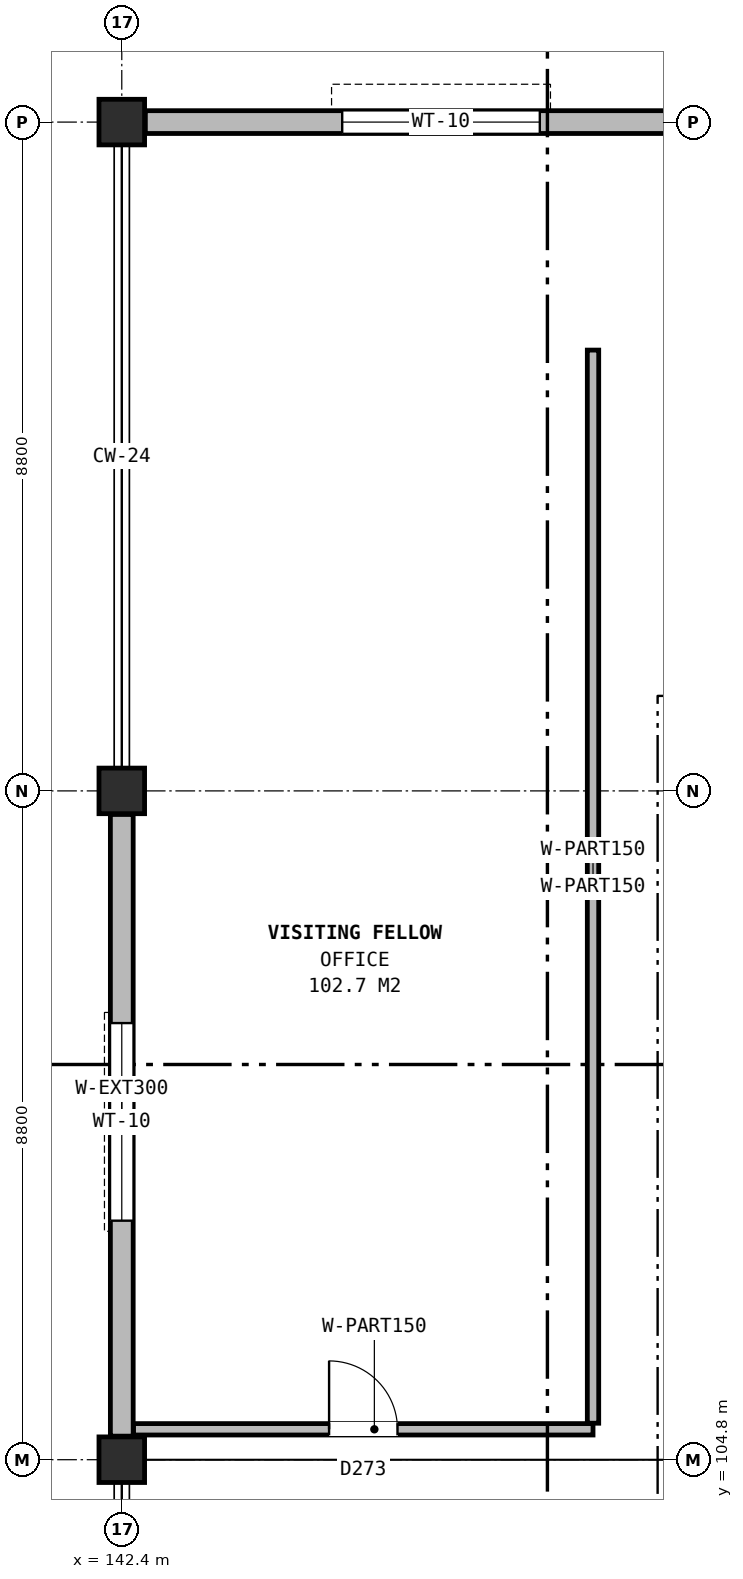
"""IFC4 building model, lengths in metres.
Left out: names, types, materials, properties, quantities, classifications, styles, units other than length and angle.
Written with IfcOpenShell. Run it as: python <this file> out.ifc"""

import sys

from ifc_helpers import new_model, si_unit, direction, frame, frame_2d, origin, origin_2d, place, context, subcontext, project, spatial, rectangle, extrude, element, fill, save


model = new_model("IFC4")
c1 = context("Model", 3, precision=1e-05, world=origin(), true_north=direction((0.0, 1.0)))
c2 = subcontext(c1, "Body", "Model", "MODEL_VIEW")
j1 = project(units=[si_unit("LENGTHUNIT", "METRE"), si_unit("PLANEANGLEUNIT", "RADIAN")], contexts=[c1])
p1 = place(None, origin())
s1 = spatial("IfcSite", under=j1, at=p1, CompositionType="ELEMENT")
p2 = place(p1, origin())
s2 = spatial("IfcBuilding", under=s1, at=p2, CompositionType="ELEMENT")
p3 = place(p2, frame((0.0, 0.0, 56.0)))
s3 = spatial("IfcBuildingStorey", under=s2, at=p3, CompositionType="ELEMENT", Elevation=56.0)
for number, where, z_axis, x_axis in (
    (1, (142.4, 104.8, 0.0), (0.0, 0.0, 1.0), (1.0, 0.0, 0.0)),
    (2, (142.4, 113.6, 0.0), (0.0, 0.0, 1.0), (1.0, 0.0, 0.0)),
    (3, (142.4, 122.4, 0.0), (0.0, 0.0, 1.0), (1.0, 0.0, 0.0)),
):
    element("IfcColumn", number, at=place(p3, frame(where, z_axis=z_axis, x_axis=x_axis)), inside=s3, PredefinedType="COLUMN", context=c2, shape_type="SweptSolid", body=[
        extrude(rectangle(XDim=0.6, YDim=0.6, at=origin_2d()), origin(), (0.0, 0.0, 1.0), 3.8),
    ])
p4 = place(p3, frame((150.49, 122.4, 0.0), z_axis=(0.0, 0.0, 1.0), x_axis=(-1.0, 0.0, 0.0)))
e4 = element("IfcWall", 4, at=p4, inside=s3, PredefinedType="SOLIDWALL", context=c2, shape_type="SweptSolid", body=[
    extrude(rectangle(XDim=7.78, YDim=0.3, at=frame_2d((3.89, 0.0))), origin(), (0.0, 0.0, 1.0), 3.05),
])
p5 = place(p4, frame((2.59, 0.0, 0.9)))
e5 = element("IfcOpeningElement", 5, at=p5, cuts=e4, PredefinedType="OPENING", context=c2, shape_type="SweptSolid", body=[
    extrude(rectangle(XDim=2.6, YDim=2.0, at=frame_2d((1.3, 1.0))), frame((0.0, 0.16, 0.0), z_axis=(0.0, -1.0, 0.0), x_axis=(1.0, 0.0, 0.0)), (0.0, 0.0, 1.0), 0.32),
])
p6 = place(p3, frame((142.4, 113.29, 0.0), z_axis=(0.0, 0.0, 1.0), x_axis=(0.0, -1.0, 0.0)))
e6 = element("IfcWall", 6, at=p6, inside=s3, PredefinedType="SOLIDWALL", context=c2, shape_type="SweptSolid", body=[
    extrude(rectangle(XDim=8.18, YDim=0.3, at=frame_2d((4.09, 0.0))), origin(), (0.0, 0.0, 1.0), 3.05),
])
p7 = place(p6, frame((2.745, 0.0, 0.9)))
e7 = element("IfcOpeningElement", 7, at=p7, cuts=e6, PredefinedType="OPENING", context=c2, shape_type="SweptSolid", body=[
    extrude(rectangle(XDim=2.6, YDim=2.0, at=frame_2d((1.3, 1.0))), frame((0.0, 0.16, 0.0), z_axis=(0.0, -1.0, 0.0), x_axis=(1.0, 0.0, 0.0)), (0.0, 0.0, 1.0), 0.32),
])
p8 = place(p3, frame((142.555, 105.2, 0.0), z_axis=(0.0, 0.0, 1.0), x_axis=(1.0, 0.0, 0.0)))
e8 = element("IfcWall", 8, at=p8, inside=s3, PredefinedType="PARTITIONING", context=c2, shape_type="SweptSolid", body=[
    extrude(rectangle(XDim=6.045, YDim=0.15, at=frame_2d((3.022, 0.0))), origin(), (0.0, 0.0, 1.0), 3.045),
])
p9 = place(p8, frame((2.573, 0.0, 0.0)))
e9 = element("IfcOpeningElement", 9, at=p9, cuts=e8, PredefinedType="OPENING", context=c2, shape_type="SweptSolid", body=[
    extrude(rectangle(XDim=0.9, YDim=2.12, at=frame_2d((0.45, 1.06))), frame((0.0, 0.085, 0.0), z_axis=(0.0, -1.0, 0.0), x_axis=(1.0, 0.0, 0.0)), (0.0, 0.0, 1.0), 0.17),
])
p10 = place(p3, frame((148.6, 105.28, 0.0), z_axis=(0.0, 0.0, 1.0), x_axis=(0.0, 1.0, 0.0)))
e10 = element("IfcWall", 10, at=p10, inside=s3, PredefinedType="PARTITIONING", context=c2, shape_type="SweptSolid", body=[
    extrude(rectangle(XDim=14.12, YDim=0.15, at=frame_2d((7.06, 0.0))), origin(), (0.0, 0.0, 1.0), 3.465),
])
p11 = place(p5, origin())
e11 = element("IfcWindow", 11, at=p11, inside=s3, PartitioningType="SINGLE_PANEL", PredefinedType="WINDOW", context=c2, shape_type="SweptSolid", body=[
    extrude(rectangle(XDim=2.6, YDim=2.0, at=frame_2d((1.3, 1.0))), frame((0.0, 0.03, 0.0), z_axis=(0.0, -1.0, 0.0), x_axis=(1.0, 0.0, 0.0)), (0.0, 0.0, 1.0), 0.06),
])
fill(e5, e11)
p12 = place(p7, origin())
e12 = element("IfcWindow", 12, at=p12, inside=s3, PartitioningType="SINGLE_PANEL", PredefinedType="WINDOW", context=c2, shape_type="SweptSolid", body=[
    extrude(rectangle(XDim=2.6, YDim=2.0, at=frame_2d((1.3, 1.0))), frame((0.0, 0.03, 0.0), z_axis=(0.0, -1.0, 0.0), x_axis=(1.0, 0.0, 0.0)), (0.0, 0.0, 1.0), 0.06),
])
fill(e7, e12)
p13 = place(p9, origin())
e13 = element("IfcDoor", 13, at=p13, inside=s3, OperationType="SINGLE_SWING_LEFT", PredefinedType="DOOR", context=c2, shape_type="SweptSolid", body=[
    extrude(rectangle(XDim=0.9, YDim=2.12, at=frame_2d((0.45, 1.06))), frame((0.0, 0.025, 0.0), z_axis=(0.0, -1.0, 0.0), x_axis=(1.0, 0.0, 0.0)), (0.0, 0.0, 1.0), 0.05),
])
fill(e9, e13)
save(model, sys.argv[1])
